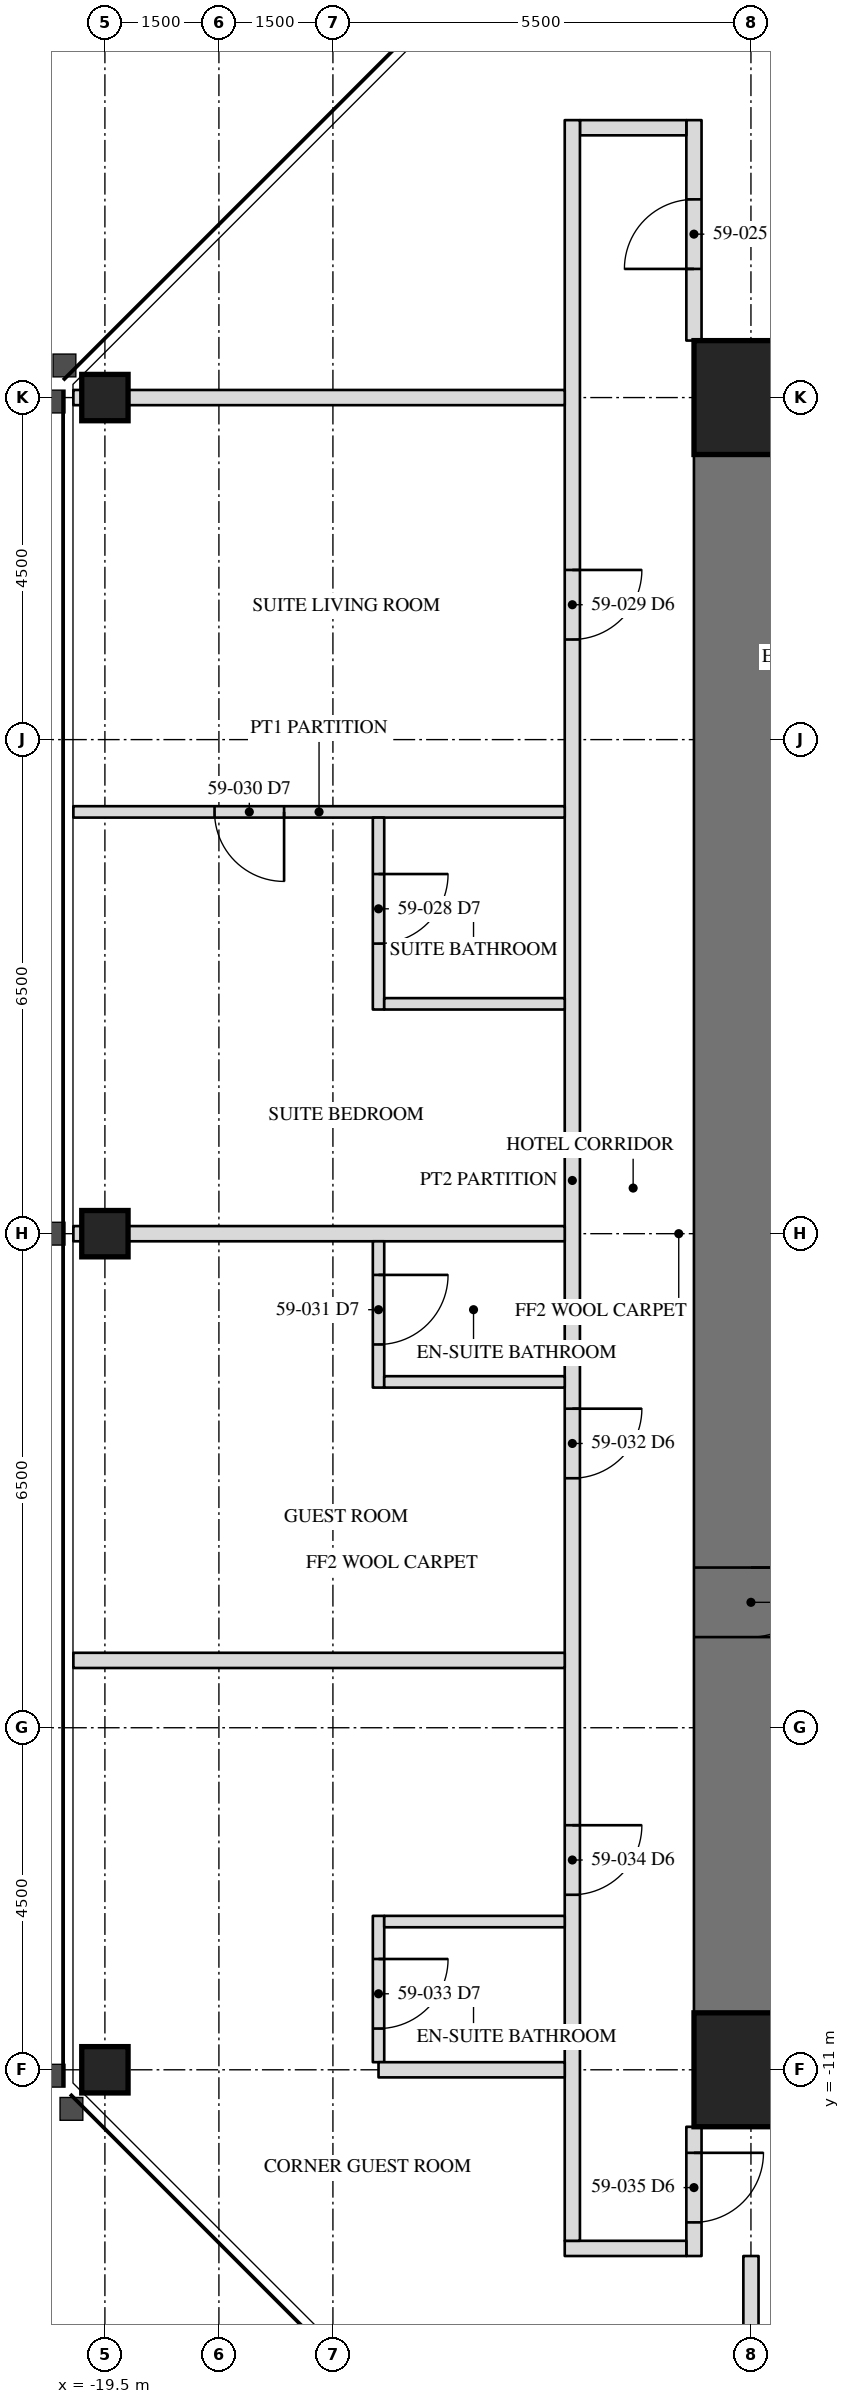
"""IFC4 building model, lengths in metres.
Left out: names, types, materials, properties, quantities, classifications, styles, units other than length and angle.
Written with IfcOpenShell. Run it as: python <this file> out.ifc"""

import sys

from ifc_helpers import new_model, si_unit, direction, frame, frame_2d, origin, origin_2d, place, context, subcontext, project, spatial, rectangle, hollow_rectangle, extrude, element, fill, save


model = new_model("IFC4")
c1 = context("Model", 3, precision=1e-05, world=origin(), true_north=direction((0.0, 1.0)))
c2 = subcontext(c1, "Body", "Model", "MODEL_VIEW")
j1 = project(units=[si_unit("LENGTHUNIT", "METRE"), si_unit("PLANEANGLEUNIT", "RADIAN")], contexts=[c1])
p1 = place(None, origin())
s1 = spatial("IfcSite", under=j1, at=p1, CompositionType="ELEMENT")
p2 = place(p1, origin())
s2 = spatial("IfcBuilding", under=s1, at=p2, CompositionType="ELEMENT")
p3 = place(p2, frame((0.0, 0.0, 243.2)))
s3 = spatial("IfcBuildingStorey", under=s2, at=p3, CompositionType="ELEMENT", Elevation=243.2)
for number, where, z_axis, x_axis in (
    (1, (-19.5, 0.0, 0.0), (0.0, 0.0, 1.0), (0.0, 1.0, 0.0)),
    (2, (-19.5, -11.0, 0.0), (0.0, 0.0, 1.0), (0.0, 1.0, 0.0)),
    (3, (-19.5, 11.0, 0.0), (0.0, 0.0, 1.0), (0.0, 1.0, 0.0)),
):
    element("IfcColumn", number, at=place(p3, frame(where, z_axis=z_axis, x_axis=x_axis)), inside=s3, PredefinedType="COLUMN", context=c2, shape_type="SweptSolid", body=[
        extrude(hollow_rectangle(XDim=0.61, YDim=0.61, WallThickness=0.051, at=origin_2d()), origin(), (0.0, 0.0, 1.0), 3.5),
    ])
p4 = place(p3, frame((-11.0, 11.0, 0.0), z_axis=(0.0, 0.0, 1.0), x_axis=(0.0, -1.0, 0.0)))
e4 = element("IfcWall", 4, at=p4, inside=s3, PredefinedType="SHEAR", context=c2, shape_type="SweptSolid", body=[
    extrude(rectangle(XDim=22.0, YDim=1.5, at=frame_2d((11.0, 0.0))), origin(), (0.0, 0.0, 1.0), 3.5),
])
p5 = place(p4, frame((15.393, 0.0, 0.0)))
e5 = element("IfcOpeningElement", 5, at=p5, cuts=e4, PredefinedType="OPENING", context=c2, shape_type="SweptSolid", body=[
    extrude(rectangle(XDim=0.915, YDim=2.134, at=frame_2d((0.458, 1.067))), frame((0.0, 0.76, 0.0), z_axis=(0.0, -1.0, 0.0), x_axis=(1.0, 0.0, 0.0)), (0.0, 0.0, 1.0), 1.52),
])
for number, where, z_axis, x_axis in (
    (6, (-6.5, 11.0, 0.0), (0.0, 0.0, 1.0), (-1.0, 0.0, 0.0)),
    (7, (-11.0, -11.0, 0.0), (0.0, 0.0, 1.0), (1.0, 0.0, 0.0)),
):
    element("IfcWall", number, at=place(p3, frame(where, z_axis=z_axis, x_axis=x_axis)), inside=s3, PredefinedType="SHEAR", context=c2, shape_type="SweptSolid", body=[
        extrude(rectangle(XDim=4.5, YDim=1.5, at=frame_2d((2.25, 0.0))), origin(), (0.0, 0.0, 1.0), 3.5),
    ])
for number, where, z_axis, x_axis in (
    (8, (-11.0, 11.0, 0.0), (0.0, 0.0, 1.0), (1.0, 0.0, 0.0)),
    (9, (-11.0, -11.0, 0.0), (0.0, 0.0, 1.0), (1.0, 0.0, 0.0)),
):
    element("IfcColumn", number, at=place(p3, frame(where, z_axis=z_axis, x_axis=x_axis)), inside=s3, PredefinedType="COLUMN", context=c2, shape_type="SweptSolid", body=[
        extrude(hollow_rectangle(XDim=1.499, YDim=1.499, WallThickness=0.102, at=origin_2d()), origin(), (0.0, 0.0, 1.0), 3.5),
    ])
p6 = place(p3, frame((-11.75, 11.75, 0.0), z_axis=(0.0, 0.0, 1.0), x_axis=(0.0, 1.0, 0.0)))
e10 = element("IfcWall", 10, at=p6, inside=s3, PredefinedType="PARTITIONING", context=c2, shape_type="SweptSolid", body=[
    extrude(rectangle(XDim=2.9, YDim=0.2, at=frame_2d((1.45, 0.0))), origin(), (0.0, 0.0, 1.0), 3.31),
])
p7 = place(p6, frame((0.942, 0.0, 0.0)))
e11 = element("IfcOpeningElement", 11, at=p7, cuts=e10, PredefinedType="OPENING", context=c2, shape_type="SweptSolid", body=[
    extrude(rectangle(XDim=0.915, YDim=2.134, at=frame_2d((0.458, 1.067))), frame((0.0, 0.11, 0.0), z_axis=(0.0, -1.0, 0.0), x_axis=(1.0, 0.0, 0.0)), (0.0, 0.0, 1.0), 0.22),
])
p8 = place(p3, frame((-11.85, 14.55, 0.0), z_axis=(0.0, 0.0, 1.0), x_axis=(-1.0, 0.0, 0.0)))
e12 = element("IfcWall", 12, at=p8, inside=s3, PredefinedType="PARTITIONING", context=c2, shape_type="SweptSolid", body=[
    extrude(rectangle(XDim=1.4, YDim=0.2, at=frame_2d((0.7, 0.0))), origin(), (0.0, 0.0, 1.0), 3.31),
])
p9 = place(p3, frame((-11.75, -11.75, 0.0), z_axis=(0.0, 0.0, 1.0), x_axis=(0.0, -1.0, 0.0)))
e13 = element("IfcWall", 13, at=p9, inside=s3, PredefinedType="PARTITIONING", context=c2, shape_type="SweptSolid", body=[
    extrude(rectangle(XDim=1.7, YDim=0.2, at=frame_2d((0.85, 0.0))), origin(), (0.0, 0.0, 1.0), 3.31),
])
p10 = place(p9, frame((0.343, 0.0, 0.0)))
e14 = element("IfcOpeningElement", 14, at=p10, cuts=e13, PredefinedType="OPENING", context=c2, shape_type="SweptSolid", body=[
    extrude(rectangle(XDim=0.915, YDim=2.134, at=frame_2d((0.458, 1.067))), frame((0.0, 0.11, 0.0), z_axis=(0.0, -1.0, 0.0), x_axis=(1.0, 0.0, 0.0)), (0.0, 0.0, 1.0), 0.22),
])
p11 = place(p3, frame((-13.45, -13.35, 0.0), z_axis=(0.0, 0.0, 1.0), x_axis=(1.0, 0.0, 0.0)))
e15 = element("IfcWall", 15, at=p11, inside=s3, PredefinedType="PARTITIONING", context=c2, shape_type="SweptSolid", body=[
    extrude(rectangle(XDim=1.6, YDim=0.2, at=frame_2d((0.8, 0.0))), origin(), (0.0, 0.0, 1.0), 3.31),
])
p12 = place(p3, frame((-13.35, 14.65, 0.0), z_axis=(0.0, 0.0, 1.0), x_axis=(0.0, -1.0, 0.0)))
e16 = element("IfcWall", 16, at=p12, inside=s3, PredefinedType="PARTITIONING", context=c2, shape_type="SweptSolid", body=[
    extrude(rectangle(XDim=27.9, YDim=0.2, at=frame_2d((13.95, 0.0))), origin(), (0.0, 0.0, 1.0), 3.31),
])
p13 = place(p12, frame((5.918, 0.0, 0.0)))
e17 = element("IfcOpeningElement", 17, at=p13, cuts=e16, PredefinedType="OPENING", context=c2, shape_type="SweptSolid", body=[
    extrude(rectangle(XDim=0.915, YDim=2.134, at=frame_2d((0.458, 1.067))), frame((0.0, 0.11, 0.0), z_axis=(0.0, -1.0, 0.0), x_axis=(1.0, 0.0, 0.0)), (0.0, 0.0, 1.0), 0.22),
])
p14 = place(p12, frame((16.952, 0.0, 0.0)))
e18 = element("IfcOpeningElement", 18, at=p14, cuts=e16, PredefinedType="OPENING", context=c2, shape_type="SweptSolid", body=[
    extrude(rectangle(XDim=0.915, YDim=2.134, at=frame_2d((0.458, 1.067))), frame((0.0, 0.11, 0.0), z_axis=(0.0, -1.0, 0.0), x_axis=(1.0, 0.0, 0.0)), (0.0, 0.0, 1.0), 0.22),
])
p15 = place(p12, frame((22.433, 0.0, 0.0)))
e19 = element("IfcOpeningElement", 19, at=p15, cuts=e16, PredefinedType="OPENING", context=c2, shape_type="SweptSolid", body=[
    extrude(rectangle(XDim=0.915, YDim=2.134, at=frame_2d((0.458, 1.067))), frame((0.0, 0.11, 0.0), z_axis=(0.0, -1.0, 0.0), x_axis=(1.0, 0.0, 0.0)), (0.0, 0.0, 1.0), 0.22),
])
for number, where, z_axis, x_axis in (
    (20, (-13.45, 11.0, 0.0), (0.0, 0.0, 1.0), (-1.0, 0.0, 0.0)),
    (21, (-13.45, 0.0, 0.0), (0.0, 0.0, 1.0), (-1.0, 0.0, 0.0)),
):
    element("IfcWall", number, at=place(p3, frame(where, z_axis=z_axis, x_axis=x_axis)), inside=s3, PredefinedType="PARTITIONING", context=c2, shape_type="SweptSolid", body=[
        extrude(rectangle(XDim=6.465, YDim=0.2, at=frame_2d((3.232, 0.0))), origin(), (0.0, 0.0, 1.0), 2.802),
    ])
p16 = place(p3, frame((-13.45, -5.614, 0.0), z_axis=(0.0, 0.0, 1.0), x_axis=(-1.0, 0.0, 0.0)))
e22 = element("IfcWall", 22, at=p16, inside=s3, PredefinedType="PARTITIONING", context=c2, shape_type="SweptSolid", body=[
    extrude(rectangle(XDim=6.465, YDim=0.2, at=frame_2d((3.232, 0.0))), origin(), (0.0, 0.0, 1.0), 3.31),
])
p17 = place(p3, frame((-13.45, 5.549, 0.0), z_axis=(0.0, 0.0, 1.0), x_axis=(-1.0, 0.0, 0.0)))
e23 = element("IfcWall", 23, at=p17, inside=s3, PredefinedType="PARTITIONING", context=c2, shape_type="SweptSolid", body=[
    extrude(rectangle(XDim=6.465, YDim=0.15, at=frame_2d((3.232, 0.0))), origin(), (0.0, 0.0, 1.0), 3.31),
])
p18 = place(p17, frame((3.692, 0.0, 0.0)))
e24 = element("IfcOpeningElement", 24, at=p18, cuts=e23, PredefinedType="OPENING", context=c2, shape_type="SweptSolid", body=[
    extrude(rectangle(XDim=0.915, YDim=2.032, at=frame_2d((0.458, 1.016))), frame((0.0, 0.085, 0.0), z_axis=(0.0, -1.0, 0.0), x_axis=(1.0, 0.0, 0.0)), (0.0, 0.0, 1.0), 0.17),
])
p19 = place(p3, frame((-15.9, 5.474, 0.0), z_axis=(0.0, 0.0, 1.0), x_axis=(0.0, -1.0, 0.0)))
e25 = element("IfcWall", 25, at=p19, inside=s3, PredefinedType="PARTITIONING", context=c2, shape_type="SweptSolid", body=[
    extrude(rectangle(XDim=2.525, YDim=0.15, at=frame_2d((1.263, 0.0))), origin(), (0.0, 0.0, 1.0), 3.31),
])
p20 = place(p19, frame((0.742, 0.0, 0.0)))
e26 = element("IfcOpeningElement", 26, at=p20, cuts=e25, PredefinedType="OPENING", context=c2, shape_type="SweptSolid", body=[
    extrude(rectangle(XDim=0.915, YDim=2.032, at=frame_2d((0.458, 1.016))), frame((0.0, 0.085, 0.0), z_axis=(0.0, -1.0, 0.0), x_axis=(1.0, 0.0, 0.0)), (0.0, 0.0, 1.0), 0.17),
])
p21 = place(p3, frame((-13.45, 3.024, 0.0), z_axis=(0.0, 0.0, 1.0), x_axis=(-1.0, 0.0, 0.0)))
e27 = element("IfcWall", 27, at=p21, inside=s3, PredefinedType="PARTITIONING", context=c2, shape_type="SweptSolid", body=[
    extrude(rectangle(XDim=2.375, YDim=0.15, at=frame_2d((1.188, 0.0))), origin(), (0.0, 0.0, 1.0), 3.31),
])
p22 = place(p3, frame((-15.9, -0.1, 0.0), z_axis=(0.0, 0.0, 1.0), x_axis=(0.0, -1.0, 0.0)))
e28 = element("IfcWall", 28, at=p22, inside=s3, PredefinedType="PARTITIONING", context=c2, shape_type="SweptSolid", body=[
    extrude(rectangle(XDim=1.925, YDim=0.15, at=frame_2d((0.962, 0.0))), origin(), (0.0, 0.0, 1.0), 3.31),
])
p23 = place(p22, frame((0.442, 0.0, 0.0)))
e29 = element("IfcOpeningElement", 29, at=p23, cuts=e28, PredefinedType="OPENING", context=c2, shape_type="SweptSolid", body=[
    extrude(rectangle(XDim=0.915, YDim=2.032, at=frame_2d((0.458, 1.016))), frame((0.0, 0.085, 0.0), z_axis=(0.0, -1.0, 0.0), x_axis=(1.0, 0.0, 0.0)), (0.0, 0.0, 1.0), 0.17),
])
p24 = place(p3, frame((-13.45, -1.95, 0.0), z_axis=(0.0, 0.0, 1.0), x_axis=(-1.0, 0.0, 0.0)))
e30 = element("IfcWall", 30, at=p24, inside=s3, PredefinedType="PARTITIONING", context=c2, shape_type="SweptSolid", body=[
    extrude(rectangle(XDim=2.375, YDim=0.15, at=frame_2d((1.188, 0.0))), origin(), (0.0, 0.0, 1.0), 3.31),
])
p25 = place(p3, frame((-15.9, -8.975, 0.0), z_axis=(0.0, 0.0, 1.0), x_axis=(0.0, -1.0, 0.0)))
e31 = element("IfcWall", 31, at=p25, inside=s3, PredefinedType="PARTITIONING", context=c2, shape_type="SweptSolid", body=[
    extrude(rectangle(XDim=1.925, YDim=0.15, at=frame_2d((0.962, 0.0))), origin(), (0.0, 0.0, 1.0), 3.31),
])
p26 = place(p25, frame((0.567, 0.0, 0.0)))
e32 = element("IfcOpeningElement", 32, at=p26, cuts=e31, PredefinedType="OPENING", context=c2, shape_type="SweptSolid", body=[
    extrude(rectangle(XDim=0.915, YDim=2.032, at=frame_2d((0.458, 1.016))), frame((0.0, 0.085, 0.0), z_axis=(0.0, -1.0, 0.0), x_axis=(1.0, 0.0, 0.0)), (0.0, 0.0, 1.0), 0.17),
])
p27 = place(p3, frame((-13.45, -9.05, 0.0), z_axis=(0.0, 0.0, 1.0), x_axis=(-1.0, 0.0, 0.0)))
e33 = element("IfcWall", 33, at=p27, inside=s3, PredefinedType="PARTITIONING", context=c2, shape_type="SweptSolid", body=[
    extrude(rectangle(XDim=2.375, YDim=0.15, at=frame_2d((1.188, 0.0))), origin(), (0.0, 0.0, 1.0), 3.31),
])
p28 = place(p3, frame((-13.45, -11.0, 0.0), z_axis=(0.0, 0.0, 1.0), x_axis=(-1.0, 0.0, 0.0)))
e34 = element("IfcWall", 34, at=p28, inside=s3, PredefinedType="PARTITIONING", context=c2, shape_type="SweptSolid", body=[
    extrude(rectangle(XDim=2.45, YDim=0.2, at=frame_2d((1.225, 0.0))), origin(), (0.0, 0.0, 1.0), 2.802),
])
p29 = place(p3, frame((-11.0, -13.45, 0.0), z_axis=(0.0, 0.0, 1.0), x_axis=(0.0, -1.0, 0.0)))
e35 = element("IfcWall", 35, at=p29, inside=s3, PredefinedType="PARTITIONING", context=c2, shape_type="SweptSolid", body=[
    extrude(rectangle(XDim=6.465, YDim=0.2, at=frame_2d((3.232, 0.0))), origin(), (0.0, 0.0, 1.0), 2.802),
])
p30 = place(p5, origin())
e36 = element("IfcDoor", 36, at=p30, inside=s3, OperationType="SINGLE_SWING_RIGHT", PredefinedType="DOOR", context=c2, shape_type="SweptSolid", body=[
    extrude(rectangle(XDim=0.915, YDim=2.134, at=frame_2d((0.458, 1.067))), frame((0.0, -0.675, 0.0), z_axis=(0.0, -1.0, 0.0), x_axis=(1.0, 0.0, 0.0)), (0.0, 0.0, 1.0), 0.05),
])
fill(e5, e36)
p31 = place(p7, origin())
e37 = element("IfcDoor", 37, at=p31, inside=s3, OperationType="SINGLE_SWING_LEFT", PredefinedType="DOOR", context=c2, shape_type="SweptSolid", body=[
    extrude(rectangle(XDim=0.915, YDim=2.134, at=frame_2d((0.458, 1.067))), frame((0.0, 0.025, 0.0), z_axis=(0.0, -1.0, 0.0), x_axis=(1.0, 0.0, 0.0)), (0.0, 0.0, 1.0), 0.05),
])
fill(e11, e37)
p32 = place(p20, origin())
e38 = element("IfcDoor", 38, at=p32, inside=s3, OperationType="SINGLE_SWING_LEFT", PredefinedType="DOOR", context=c2, shape_type="SweptSolid", body=[
    extrude(rectangle(XDim=0.915, YDim=2.032, at=frame_2d((0.458, 1.016))), frame((0.0, 0.025, 0.0), z_axis=(0.0, -1.0, 0.0), x_axis=(1.0, 0.0, 0.0)), (0.0, 0.0, 1.0), 0.05),
])
fill(e26, e38)
p33 = place(p13, origin())
e39 = element("IfcDoor", 39, at=p33, inside=s3, OperationType="SINGLE_SWING_LEFT", PredefinedType="DOOR", context=c2, shape_type="SweptSolid", body=[
    extrude(rectangle(XDim=0.915, YDim=2.134, at=frame_2d((0.458, 1.067))), frame((0.0, 0.025, 0.0), z_axis=(0.0, -1.0, 0.0), x_axis=(1.0, 0.0, 0.0)), (0.0, 0.0, 1.0), 0.05),
])
fill(e17, e39)
p34 = place(p18, origin())
e40 = element("IfcDoor", 40, at=p34, inside=s3, OperationType="SINGLE_SWING_LEFT", PredefinedType="DOOR", context=c2, shape_type="SweptSolid", body=[
    extrude(rectangle(XDim=0.915, YDim=2.032, at=frame_2d((0.458, 1.016))), frame((0.0, 0.025, 0.0), z_axis=(0.0, -1.0, 0.0), x_axis=(1.0, 0.0, 0.0)), (0.0, 0.0, 1.0), 0.05),
])
fill(e24, e40)
p35 = place(p23, origin())
e41 = element("IfcDoor", 41, at=p35, inside=s3, OperationType="SINGLE_SWING_LEFT", PredefinedType="DOOR", context=c2, shape_type="SweptSolid", body=[
    extrude(rectangle(XDim=0.915, YDim=2.032, at=frame_2d((0.458, 1.016))), frame((0.0, 0.025, 0.0), z_axis=(0.0, -1.0, 0.0), x_axis=(1.0, 0.0, 0.0)), (0.0, 0.0, 1.0), 0.05),
])
fill(e29, e41)
p36 = place(p14, origin())
e42 = element("IfcDoor", 42, at=p36, inside=s3, OperationType="SINGLE_SWING_LEFT", PredefinedType="DOOR", context=c2, shape_type="SweptSolid", body=[
    extrude(rectangle(XDim=0.915, YDim=2.134, at=frame_2d((0.458, 1.067))), frame((0.0, 0.025, 0.0), z_axis=(0.0, -1.0, 0.0), x_axis=(1.0, 0.0, 0.0)), (0.0, 0.0, 1.0), 0.05),
])
fill(e18, e42)
p37 = place(p26, origin())
e43 = element("IfcDoor", 43, at=p37, inside=s3, OperationType="SINGLE_SWING_LEFT", PredefinedType="DOOR", context=c2, shape_type="SweptSolid", body=[
    extrude(rectangle(XDim=0.915, YDim=2.032, at=frame_2d((0.458, 1.016))), frame((0.0, 0.025, 0.0), z_axis=(0.0, -1.0, 0.0), x_axis=(1.0, 0.0, 0.0)), (0.0, 0.0, 1.0), 0.05),
])
fill(e32, e43)
p38 = place(p15, origin())
e44 = element("IfcDoor", 44, at=p38, inside=s3, OperationType="SINGLE_SWING_LEFT", PredefinedType="DOOR", context=c2, shape_type="SweptSolid", body=[
    extrude(rectangle(XDim=0.915, YDim=2.134, at=frame_2d((0.458, 1.067))), frame((0.0, 0.025, 0.0), z_axis=(0.0, -1.0, 0.0), x_axis=(1.0, 0.0, 0.0)), (0.0, 0.0, 1.0), 0.05),
])
fill(e19, e44)
p39 = place(p10, origin())
e45 = element("IfcDoor", 45, at=p39, inside=s3, OperationType="SINGLE_SWING_LEFT", PredefinedType="DOOR", context=c2, shape_type="SweptSolid", body=[
    extrude(rectangle(XDim=0.915, YDim=2.134, at=frame_2d((0.458, 1.067))), frame((0.0, 0.025, 0.0), z_axis=(0.0, -1.0, 0.0), x_axis=(1.0, 0.0, 0.0)), (0.0, 0.0, 1.0), 0.05),
])
fill(e14, e45)
save(model, sys.argv[1])
